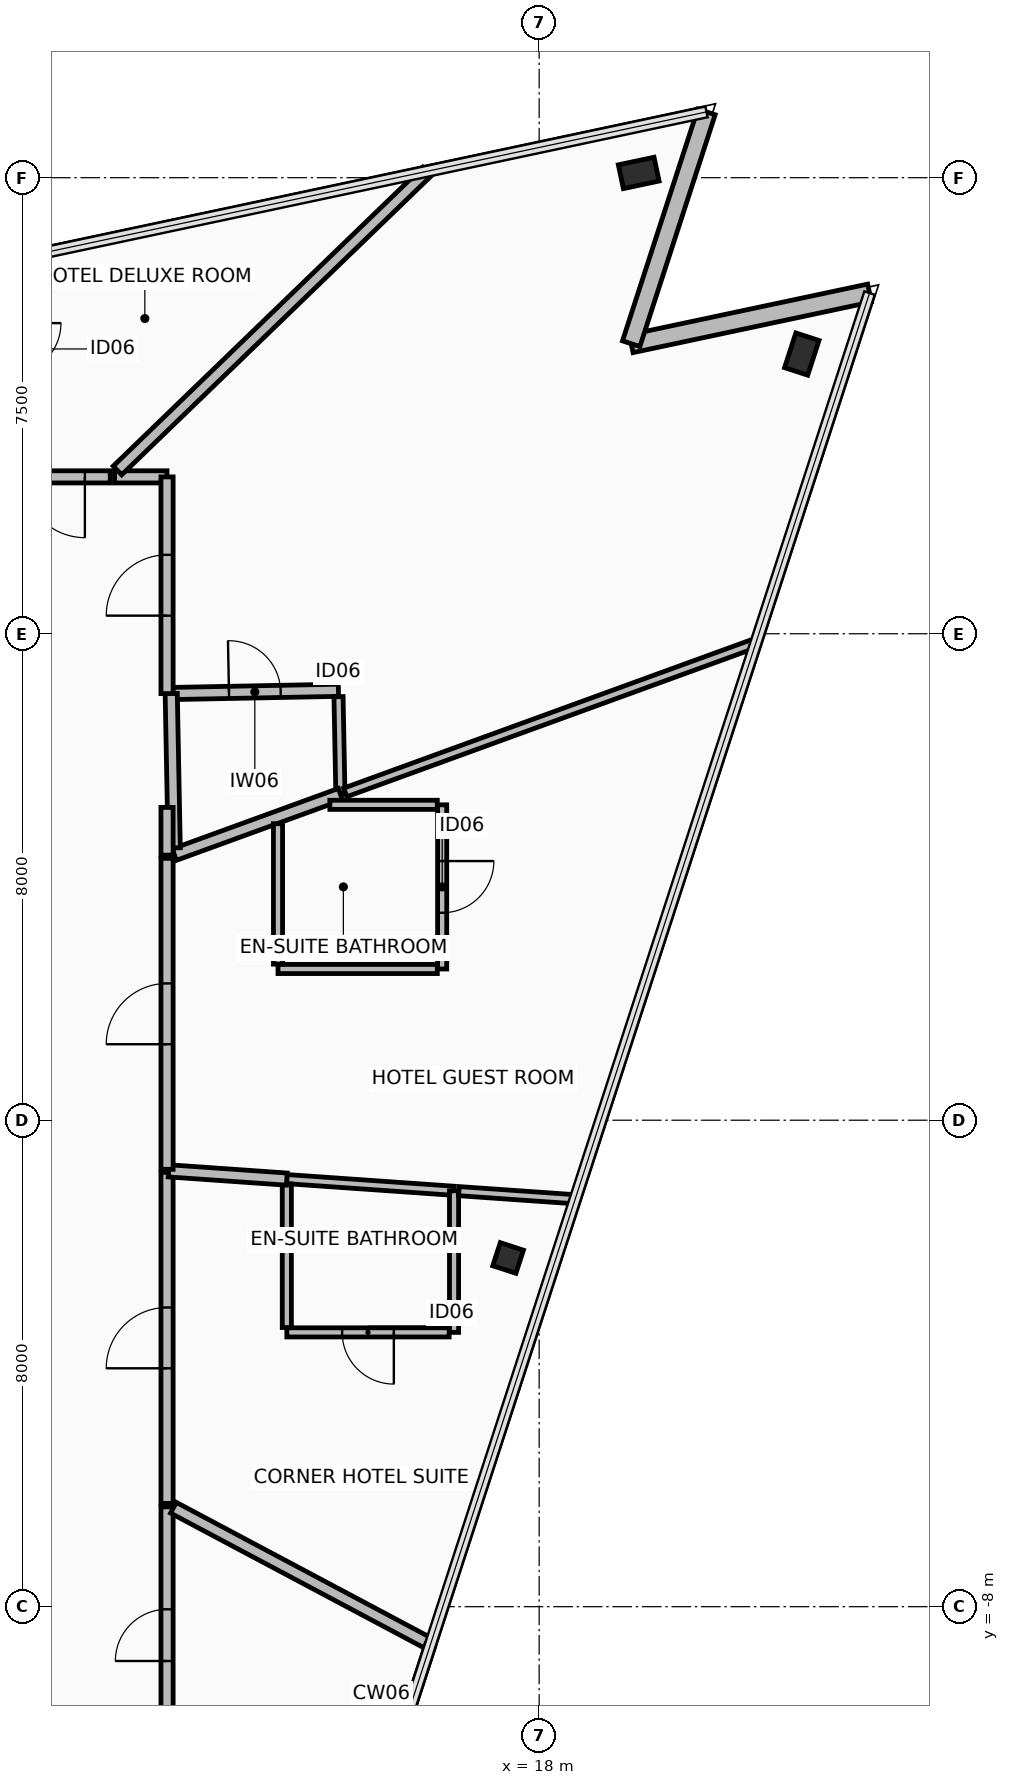
"""IFC4 building model, lengths in metres.
Left out: names, types, materials, properties, quantities, classifications, styles, units other than length and angle.
Written with IfcOpenShell. Run it as: python <this file> out.ifc"""

import sys

from ifc_helpers import new_model, si_unit, direction, frame, frame_2d, origin, origin_2d, place, context, subcontext, project, spatial, rectangle, hollow_rectangle, extrude, element, fill, save


model = new_model("IFC4")
c1 = context("Model", 3, precision=1e-05, world=origin(), true_north=direction((0.0, 1.0)))
c2 = subcontext(c1, "Body", "Model", "MODEL_VIEW")
j1 = project(units=[si_unit("LENGTHUNIT", "METRE"), si_unit("PLANEANGLEUNIT", "RADIAN")], contexts=[c1])
p1 = place(None, origin())
s1 = spatial("IfcSite", under=j1, at=p1, CompositionType="ELEMENT")
p2 = place(p1, origin())
s2 = spatial("IfcBuilding", under=s1, at=p2, CompositionType="ELEMENT")
p3 = place(p2, frame((0.0, 0.0, 294.35)))
s3 = spatial("IfcBuildingStorey", under=s2, at=p3, CompositionType="ELEMENT", Elevation=294.35)
p4 = place(p3, frame((17.489, -2.265, 0.0), z_axis=(0.0, 0.0, 1.0), x_axis=(0.309018654281, 0.951055976957, 0.0)))
e1 = element("IfcColumn", 1, at=p4, inside=s3, PredefinedType="COLUMN", context=c2, shape_type="SweptSolid", body=[
    extrude(hollow_rectangle(XDim=0.4, YDim=0.4, WallThickness=0.025, at=origin_2d()), origin(), (0.0, 0.0, 1.0), 3.65),
])
for number, where, z_axis, x_axis in (
    (2, (22.319, 12.6, 0.0), (0.0, 0.0, 1.0), (0.309, 0.951, 0.0)),
    (3, (19.637, 15.578, 0.0), (0.0, 0.0, 1.0), (0.978, 0.208, 0.0)),
):
    element("IfcColumn", number, at=place(p3, frame(where, z_axis=z_axis, x_axis=x_axis)), inside=s3, PredefinedType="COLUMN", context=c2, shape_type="SweptSolid", body=[
        extrude(hollow_rectangle(XDim=0.4, YDim=0.6, WallThickness=0.03, at=origin_2d()), origin(), (0.0, 0.0, 1.0), 3.65),
    ])
p5 = place(p3, frame((23.434, 13.603, 0.0), z_axis=(0.0, 0.0, 1.0), x_axis=(-0.97815049033, -0.207898095871, 0.0)))
e4 = element("IfcWall", 4, at=p5, inside=s3, PredefinedType="STANDARD", context=c2, shape_type="SweptSolid", body=[
    extrude(rectangle(XDim=4.008, YDim=0.3, at=frame_2d((2.004, 0.0))), origin(), (0.0, 0.0, 1.0), 2.795),
])
p6 = place(p3, frame((19.513, 12.77, 0.0), z_axis=(0.0, 0.0, 1.0), x_axis=(0.309018580232, 0.951056001018, 0.0)))
e5 = element("IfcWall", 5, at=p6, inside=s3, PredefinedType="STANDARD", context=c2, shape_type="SweptSolid", body=[
    extrude(rectangle(XDim=4.008, YDim=0.3, at=frame_2d((2.004, 0.0))), origin(), (0.0, 0.0, 1.0), 2.795),
])
p7 = place(p3, frame((11.949, 7.017, 0.0), z_axis=(0.0, 0.0, 1.0), x_axis=(0.999812703389, 0.019353504647, 0.0)))
e6 = element("IfcWall", 6, at=p7, inside=s3, PredefinedType="PARTITIONING", context=c2, shape_type="SweptSolid", body=[
    extrude(rectangle(XDim=2.75, YDim=0.2, at=frame_2d((1.375, 0.0))), origin(), (0.0, 0.0, 1.0), 3.205),
])
p8 = place(p7, frame((0.95, 0.0, 0.0)))
e7 = element("IfcOpeningElement", 7, at=p8, cuts=e6, PredefinedType="OPENING", context=c2, shape_type="SweptSolid", body=[
    extrude(rectangle(XDim=0.85, YDim=2.1, at=frame_2d((0.425, 1.05))), frame((0.0, 0.11, 0.0), z_axis=(0.0, -1.0, 0.0), x_axis=(1.0, 0.0, 0.0)), (0.0, 0.0, 1.0), 0.22),
])
p9 = place(p3, frame((14.7, 6.965, 0.0), z_axis=(0.0, 0.0, 1.0), x_axis=(0.01933256163, -0.999813108566, 0.0)))
e8 = element("IfcWall", 8, at=p9, inside=s3, PredefinedType="PARTITIONING", context=c2, shape_type="SweptSolid", body=[
    extrude(rectangle(XDim=1.604, YDim=0.15, at=frame_2d((0.802, 0.0))), origin(), (0.0, 0.0, 1.0), 3.205),
])
p10 = place(p3, frame((14.731, 5.362, 0.0), z_axis=(0.0, 0.0, 1.0), x_axis=(-0.939685466816, -0.342039798058, 0.0)))
e9 = element("IfcWall", 9, at=p10, inside=s3, PredefinedType="PARTITIONING", context=c2, shape_type="SweptSolid", body=[
    extrude(rectangle(XDim=2.906, YDim=0.2, at=frame_2d((1.453, 0.0))), origin(), (0.0, 0.0, 1.0), 3.205),
])
p11 = place(p3, frame((11.998, 4.479, 0.0), z_axis=(0.0, 0.0, 1.0), x_axis=(-0.019327029844, 0.999813215514, 0.0)))
e10 = element("IfcWall", 10, at=p11, inside=s3, PredefinedType="PARTITIONING", context=c2, shape_type="SweptSolid", body=[
    extrude(rectangle(XDim=2.539, YDim=0.2, at=frame_2d((1.27, 0.0))), origin(), (0.0, 0.0, 1.0), 3.45),
])
p12 = place(p3, frame((13.85, -0.969, 0.0), z_axis=(0.0, 0.0, 1.0), x_axis=(0.997561927417, -0.069786825178, 0.0)))
e11 = element("IfcWall", 11, at=p12, inside=s3, PredefinedType="PARTITIONING", context=c2, shape_type="SweptSolid", body=[
    extrude(rectangle(XDim=2.757, YDim=0.15, at=frame_2d((1.378, 0.0))), origin(), (0.0, 0.0, 1.0), 3.205),
])
p13 = place(p3, frame((16.6, -1.161, 0.0), z_axis=(0.0, 0.0, 1.0), x_axis=(0.0, -1.0, 0.0)))
e12 = element("IfcWall", 12, at=p13, inside=s3, PredefinedType="PARTITIONING", context=c2, shape_type="SweptSolid", body=[
    extrude(rectangle(XDim=2.328, YDim=0.15, at=frame_2d((1.164, 0.0))), origin(), (0.0, 0.0, 1.0), 2.945),
])
p14 = place(p3, frame((16.52, -3.489, 0.0), z_axis=(0.0, 0.0, 1.0), x_axis=(-1.0, 0.0, 0.0)))
e13 = element("IfcWall", 13, at=p14, inside=s3, PredefinedType="PARTITIONING", context=c2, shape_type="SweptSolid", body=[
    extrude(rectangle(XDim=2.67, YDim=0.15, at=frame_2d((1.335, 0.0))), origin(), (0.0, 0.0, 1.0), 2.945),
])
p15 = place(p14, frame((0.91, 0.0, 0.0)))
e14 = element("IfcOpeningElement", 14, at=p15, cuts=e13, PredefinedType="OPENING", context=c2, shape_type="SweptSolid", body=[
    extrude(rectangle(XDim=0.85, YDim=2.1, at=frame_2d((0.425, 1.05))), frame((0.0, 0.085, 0.0), z_axis=(0.0, -1.0, 0.0), x_axis=(1.0, 0.0, 0.0)), (0.0, 0.0, 1.0), 0.17),
])
p16 = place(p3, frame((13.85, -3.409, 0.0), z_axis=(0.0, 0.0, 1.0), x_axis=(0.0, 1.0, 0.0)))
e15 = element("IfcWall", 15, at=p16, inside=s3, PredefinedType="PARTITIONING", context=c2, shape_type="SweptSolid", body=[
    extrude(rectangle(XDim=2.361, YDim=0.15, at=frame_2d((1.18, 0.0))), origin(), (0.0, 0.0, 1.0), 3.45),
])
p17 = place(p3, frame((16.405, 5.187, 0.0), z_axis=(0.0, 0.0, 1.0), x_axis=(0.0, -1.0, 0.0)))
e16 = element("IfcWall", 16, at=p17, inside=s3, PredefinedType="PARTITIONING", context=c2, shape_type="SweptSolid", body=[
    extrude(rectangle(XDim=2.7, YDim=0.15, at=frame_2d((1.35, 0.0))), origin(), (0.0, 0.0, 1.0), 3.205),
])
p18 = place(p17, frame((0.925, 0.0, 0.0)))
e17 = element("IfcOpeningElement", 17, at=p18, cuts=e16, PredefinedType="OPENING", context=c2, shape_type="SweptSolid", body=[
    extrude(rectangle(XDim=0.85, YDim=2.1, at=frame_2d((0.425, 1.05))), frame((0.0, 0.085, 0.0), z_axis=(0.0, -1.0, 0.0), x_axis=(1.0, 0.0, 0.0)), (0.0, 0.0, 1.0), 0.17),
])
p19 = place(p3, frame((16.325, 2.487, 0.0), z_axis=(0.0, 0.0, 1.0), x_axis=(-1.0, 0.0, 0.0)))
e18 = element("IfcWall", 18, at=p19, inside=s3, PredefinedType="PARTITIONING", context=c2, shape_type="SweptSolid", body=[
    extrude(rectangle(XDim=2.62, YDim=0.15, at=frame_2d((1.31, 0.0))), origin(), (0.0, 0.0, 1.0), 3.205),
])
p20 = place(p3, frame((13.705, 2.567, 0.0), z_axis=(0.0, 0.0, 1.0), x_axis=(0.0, 1.0, 0.0)))
e19 = element("IfcWall", 19, at=p20, inside=s3, PredefinedType="PARTITIONING", context=c2, shape_type="SweptSolid", body=[
    extrude(rectangle(XDim=2.31, YDim=0.15, at=frame_2d((1.155, 0.0))), origin(), (0.0, 0.0, 1.0), 3.45),
])
p21 = place(p3, frame((14.558, 5.187, 0.0), z_axis=(0.0, 0.0, 1.0), x_axis=(1.0, 0.0, 0.0)))
e20 = element("IfcWall", 20, at=p21, inside=s3, PredefinedType="PARTITIONING", context=c2, shape_type="SweptSolid", body=[
    extrude(rectangle(XDim=1.767, YDim=0.15, at=frame_2d((0.884, 0.0))), origin(), (0.0, 0.0, 1.0), 3.205),
])
p22 = place(p3, frame((11.88, -10.579, 0.0), z_axis=(0.0, 0.0, 1.0), x_axis=(0.0, 1.0, 0.0)))
e21 = element("IfcWall", 21, at=p22, inside=s3, PredefinedType="PARTITIONING", context=c2, shape_type="SweptSolid", body=[
    extrude(rectangle(XDim=4.221, YDim=0.2, at=frame_2d((2.11, 0.0))), origin(), (0.0, 0.0, 1.0), 3.205),
])
p23 = place(p22, frame((1.686, 0.0, 0.0)))
e22 = element("IfcOpeningElement", 22, at=p23, cuts=e21, PredefinedType="OPENING", context=c2, shape_type="SweptSolid", body=[
    extrude(rectangle(XDim=0.85, YDim=2.1, at=frame_2d((0.425, 1.05))), frame((0.0, 0.11, 0.0), z_axis=(0.0, -1.0, 0.0), x_axis=(1.0, 0.0, 0.0)), (0.0, 0.0, 1.0), 0.22),
])
p24 = place(p3, frame((11.985, -6.373, 0.0), z_axis=(0.0, 0.0, 1.0), x_axis=(0.882951887582, -0.469463485498, 0.0)))
e23 = element("IfcWall", 23, at=p24, inside=s3, PredefinedType="PARTITIONING", context=c2, shape_type="SweptSolid", body=[
    extrude(rectangle(XDim=4.767, YDim=0.2, at=frame_2d((2.384, 0.0))), origin(), (0.0, 0.0, 1.0), 2.795),
])
p25 = place(p3, frame((16.206, -8.64, 0.0), z_axis=(0.0, 0.0, 1.0), x_axis=(-0.308993456207, -0.951064163988, 0.0)))
e24 = element("IfcWall", 24, at=p25, inside=s3, PredefinedType="PARTITIONING", context=c2, shape_type="SweptSolid", body=[
    extrude(rectangle(XDim=8.941, YDim=0.15, at=frame_2d((4.47, 0.0))), origin(), (0.0, 0.0, 1.0), 3.45),
])
p26 = place(p3, frame((11.879, 10.58, 0.0), z_axis=(0.0, 0.0, 1.0), x_axis=(-1.0, 0.0, 0.0)))
e25 = element("IfcWall", 25, at=p26, inside=s3, PredefinedType="PARTITIONING", context=c2, shape_type="SweptSolid", body=[
    extrude(rectangle(XDim=0.862, YDim=0.2, at=frame_2d((0.431, 0.0))), origin(), (0.0, 0.0, 1.0), 3.45),
])
p27 = place(p3, frame((11.065, 10.685, 0.0), z_axis=(0.0, 0.0, 1.0), x_axis=(0.719349741171, 0.694648076278, 0.0)))
e26 = element("IfcWall", 26, at=p27, inside=s3, PredefinedType="PARTITIONING", context=c2, shape_type="SweptSolid", body=[
    extrude(rectangle(XDim=7.077, YDim=0.2, at=frame_2d((3.538, 0.0))), origin(), (0.0, 0.0, 1.0), 2.795),
])
p28 = place(p3, frame((21.553, 7.844, 0.0), z_axis=(0.0, 0.0, 1.0), x_axis=(-0.939693036583, -0.34201900093, 0.0)))
e27 = element("IfcWall", 27, at=p28, inside=s3, PredefinedType="PARTITIONING", context=c2, shape_type="SweptSolid", body=[
    extrude(rectangle(XDim=7.175, YDim=0.15, at=frame_2d((3.587, 0.0))), origin(), (0.0, 0.0, 1.0), 2.795),
])
p29 = place(p3, frame((11.88, 4.36, 0.0), z_axis=(0.0, 0.0, 1.0), x_axis=(0.0, 1.0, 0.0)))
e28 = element("IfcWall", 28, at=p29, inside=s3, PredefinedType="PARTITIONING", context=c2, shape_type="SweptSolid", body=[
    extrude(rectangle(XDim=0.785, YDim=0.2, at=frame_2d((0.393, 0.0))), origin(), (0.0, 0.0, 1.0), 3.45),
])
p30 = place(p3, frame((11.88, 7.016, 0.0), z_axis=(0.0, 0.0, 1.0), x_axis=(0.0, 1.0, 0.0)))
e29 = element("IfcWall", 29, at=p30, inside=s3, PredefinedType="PARTITIONING", context=c2, shape_type="SweptSolid", body=[
    extrude(rectangle(XDim=3.563, YDim=0.2, at=frame_2d((1.782, 0.0))), origin(), (0.0, 0.0, 1.0), 2.945),
])
p31 = place(p30, frame((1.282, 0.0, 0.0)))
e30 = element("IfcOpeningElement", 30, at=p31, cuts=e29, PredefinedType="OPENING", context=c2, shape_type="SweptSolid", body=[
    extrude(rectangle(XDim=1.0, YDim=2.15, at=frame_2d((0.5, 1.075))), frame((0.0, 0.11, 0.0), z_axis=(0.0, -1.0, 0.0), x_axis=(1.0, 0.0, 0.0)), (0.0, 0.0, 1.0), 0.22),
])
p32 = place(p3, frame((10.946, 10.58, 0.0), z_axis=(0.0, 0.0, 1.0), x_axis=(-1.0, 0.0, 0.0)))
e31 = element("IfcWall", 31, at=p32, inside=s3, PredefinedType="PARTITIONING", context=c2, shape_type="SweptSolid", body=[
    extrude(rectangle(XDim=6.634, YDim=0.2, at=frame_2d((3.317, 0.0))), origin(), (0.0, 0.0, 1.0), 2.945),
])
p33 = place(p32, frame((0.417, 0.0, 0.0)))
e32 = element("IfcOpeningElement", 32, at=p33, cuts=e31, PredefinedType="OPENING", context=c2, shape_type="SweptSolid", body=[
    extrude(rectangle(XDim=1.0, YDim=2.15, at=frame_2d((0.5, 1.075))), frame((0.0, 0.11, 0.0), z_axis=(0.0, -1.0, 0.0), x_axis=(1.0, 0.0, 0.0)), (0.0, 0.0, 1.0), 0.22),
])
p34 = place(p3, frame((11.88, -6.302, 0.0), z_axis=(0.0, 0.0, 1.0), x_axis=(0.0, 1.0, 0.0)))
e33 = element("IfcWall", 33, at=p34, inside=s3, PredefinedType="PARTITIONING", context=c2, shape_type="SweptSolid", body=[
    extrude(rectangle(XDim=5.444, YDim=0.2, at=frame_2d((2.722, 0.0))), origin(), (0.0, 0.0, 1.0), 2.945),
])
p35 = place(p34, frame((2.222, 0.0, 0.0)))
e34 = element("IfcOpeningElement", 34, at=p35, cuts=e33, PredefinedType="OPENING", context=c2, shape_type="SweptSolid", body=[
    extrude(rectangle(XDim=1.0, YDim=2.15, at=frame_2d((0.5, 1.075))), frame((0.0, 0.11, 0.0), z_axis=(0.0, -1.0, 0.0), x_axis=(1.0, 0.0, 0.0)), (0.0, 0.0, 1.0), 0.22),
])
p36 = place(p3, frame((11.907, -0.833, 0.0), z_axis=(0.0, 0.0, 1.0), x_axis=(0.997560712778, -0.069804185555, 0.0)))
e35 = element("IfcWall", 35, at=p36, inside=s3, PredefinedType="PARTITIONING", context=c2, shape_type="SweptSolid", body=[
    extrude(rectangle(XDim=1.948, YDim=0.2, at=frame_2d((0.974, 0.0))), origin(), (0.0, 0.0, 1.0), 3.205),
])
p37 = place(p3, frame((16.68, -1.167, 0.0), z_axis=(0.0, 0.0, 1.0), x_axis=(0.997568719621, -0.06968966662, 0.0)))
e36 = element("IfcWall", 36, at=p37, inside=s3, PredefinedType="PARTITIONING", context=c2, shape_type="SweptSolid", body=[
    extrude(rectangle(XDim=1.916, YDim=0.15, at=frame_2d((0.958, 0.0))), origin(), (0.0, 0.0, 1.0), 2.795),
])
p38 = place(p3, frame((11.88, -0.807, 0.0), z_axis=(0.0, 0.0, 1.0), x_axis=(0.0, 1.0, 0.0)))
e37 = element("IfcWall", 37, at=p38, inside=s3, PredefinedType="PARTITIONING", context=c2, shape_type="SweptSolid", body=[
    extrude(rectangle(XDim=5.114, YDim=0.2, at=frame_2d((2.557, 0.0))), origin(), (0.0, 0.0, 1.0), 3.45),
])
p39 = place(p38, frame((2.057, 0.0, 0.0)))
e38 = element("IfcOpeningElement", 38, at=p39, cuts=e37, PredefinedType="OPENING", context=c2, shape_type="SweptSolid", body=[
    extrude(rectangle(XDim=1.0, YDim=2.15, at=frame_2d((0.5, 1.075))), frame((0.0, 0.11, 0.0), z_axis=(0.0, -1.0, 0.0), x_axis=(1.0, 0.0, 0.0)), (0.0, 0.0, 1.0), 0.22),
])
p40 = place(p8, origin())
e39 = element("IfcDoor", 39, at=p40, inside=s3, OperationType="SINGLE_SWING_RIGHT", PredefinedType="DOOR", context=c2, shape_type="SweptSolid", body=[
    extrude(rectangle(XDim=0.85, YDim=2.1, at=frame_2d((0.425, 1.05))), frame((0.0, 0.025, 0.0), z_axis=(0.0, -1.0, 0.0), x_axis=(1.0, 0.0, 0.0)), (0.0, 0.0, 1.0), 0.05),
])
fill(e7, e39)
p41 = place(p15, origin())
e40 = element("IfcDoor", 40, at=p41, inside=s3, OperationType="SINGLE_SWING_RIGHT", PredefinedType="DOOR", context=c2, shape_type="SweptSolid", body=[
    extrude(rectangle(XDim=0.85, YDim=2.1, at=frame_2d((0.425, 1.05))), frame((0.0, 0.025, 0.0), z_axis=(0.0, -1.0, 0.0), x_axis=(1.0, 0.0, 0.0)), (0.0, 0.0, 1.0), 0.05),
])
fill(e14, e40)
p42 = place(p18, origin())
e41 = element("IfcDoor", 41, at=p42, inside=s3, OperationType="SINGLE_SWING_RIGHT", PredefinedType="DOOR", context=c2, shape_type="SweptSolid", body=[
    extrude(rectangle(XDim=0.85, YDim=2.1, at=frame_2d((0.425, 1.05))), frame((0.0, 0.025, 0.0), z_axis=(0.0, -1.0, 0.0), x_axis=(1.0, 0.0, 0.0)), (0.0, 0.0, 1.0), 0.05),
])
fill(e17, e41)
p43 = place(p23, origin())
e42 = element("IfcDoor", 42, at=p43, inside=s3, OperationType="SINGLE_SWING_RIGHT", PredefinedType="DOOR", context=c2, shape_type="SweptSolid", body=[
    extrude(rectangle(XDim=0.85, YDim=2.1, at=frame_2d((0.425, 1.05))), frame((0.0, 0.025, 0.0), z_axis=(0.0, -1.0, 0.0), x_axis=(1.0, 0.0, 0.0)), (0.0, 0.0, 1.0), 0.05),
])
fill(e22, e42)
p44 = place(p31, origin())
e43 = element("IfcDoor", 43, at=p44, inside=s3, OperationType="SINGLE_SWING_LEFT", PredefinedType="DOOR", context=c2, shape_type="SweptSolid", body=[
    extrude(rectangle(XDim=1.0, YDim=2.15, at=frame_2d((0.5, 1.075))), frame((0.0, 0.025, 0.0), z_axis=(0.0, -1.0, 0.0), x_axis=(1.0, 0.0, 0.0)), (0.0, 0.0, 1.0), 0.05),
])
fill(e30, e43)
p45 = place(p33, origin())
e44 = element("IfcDoor", 44, at=p45, inside=s3, OperationType="SINGLE_SWING_LEFT", PredefinedType="DOOR", context=c2, shape_type="SweptSolid", body=[
    extrude(rectangle(XDim=1.0, YDim=2.15, at=frame_2d((0.5, 1.075))), frame((0.0, 0.025, 0.0), z_axis=(0.0, -1.0, 0.0), x_axis=(1.0, 0.0, 0.0)), (0.0, 0.0, 1.0), 0.05),
])
fill(e32, e44)
p46 = place(p35, origin())
e45 = element("IfcDoor", 45, at=p46, inside=s3, OperationType="SINGLE_SWING_LEFT", PredefinedType="DOOR", context=c2, shape_type="SweptSolid", body=[
    extrude(rectangle(XDim=1.0, YDim=2.15, at=frame_2d((0.5, 1.075))), frame((0.0, 0.025, 0.0), z_axis=(0.0, -1.0, 0.0), x_axis=(1.0, 0.0, 0.0)), (0.0, 0.0, 1.0), 0.05),
])
fill(e34, e45)
p47 = place(p39, origin())
e46 = element("IfcDoor", 46, at=p47, inside=s3, OperationType="SINGLE_SWING_LEFT", PredefinedType="DOOR", context=c2, shape_type="SweptSolid", body=[
    extrude(rectangle(XDim=1.0, YDim=2.15, at=frame_2d((0.5, 1.075))), frame((0.0, 0.025, 0.0), z_axis=(0.0, -1.0, 0.0), x_axis=(1.0, 0.0, 0.0)), (0.0, 0.0, 1.0), 0.05),
])
fill(e38, e46)
save(model, sys.argv[1])
